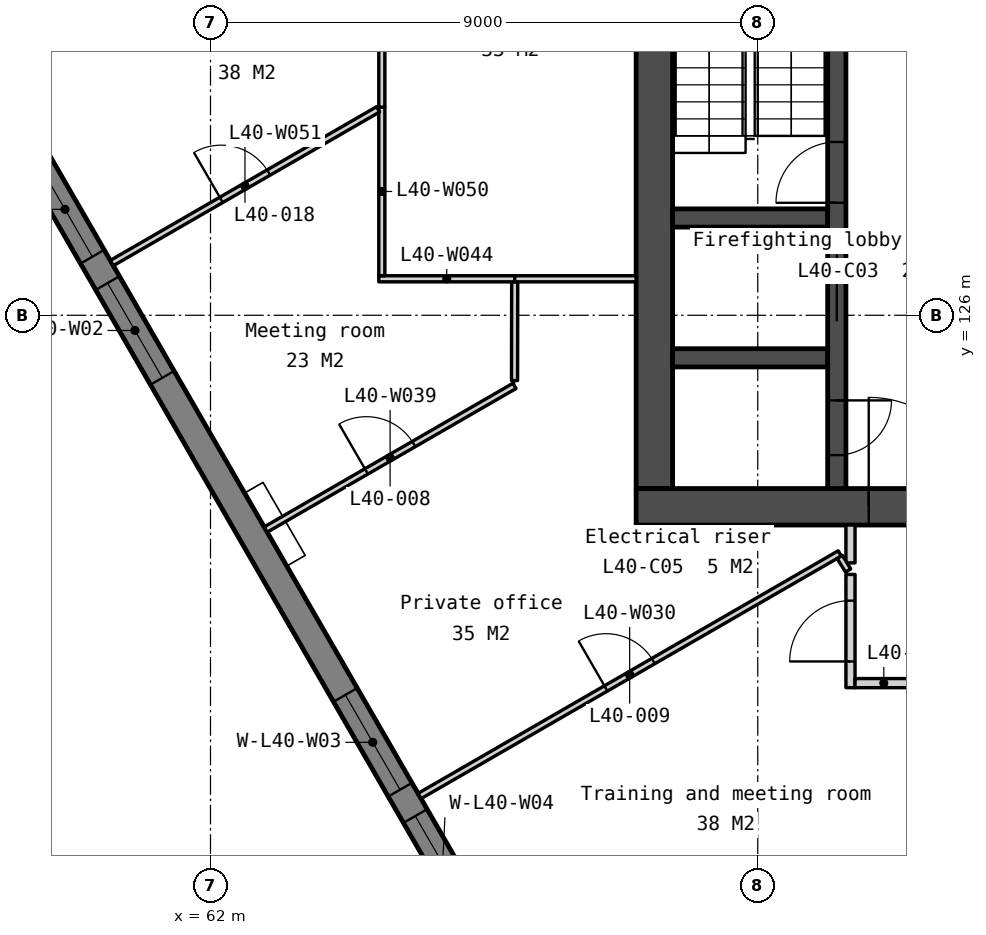
"""IFC4 building model, lengths in metres.
Left out: names, types, materials, properties, quantities, classifications, styles, units other than length and angle.
Written with IfcOpenShell. Run it as: python <this file> out.ifc"""

import sys

from ifc_helpers import new_model, si_unit, direction, frame, frame_2d, origin, place, context, subcontext, project, spatial, polyline, rectangle, outline, extrude, element, fill, save


model = new_model("IFC4")
c1 = context("Model", 3, precision=1e-05, world=origin(), true_north=direction((0.0, 1.0)))
c2 = subcontext(c1, "Body", "Model", "MODEL_VIEW")
j1 = project(units=[si_unit("LENGTHUNIT", "METRE"), si_unit("PLANEANGLEUNIT", "RADIAN")], contexts=[c1])
p1 = place(None, origin())
s1 = spatial("IfcSite", under=j1, at=p1, CompositionType="ELEMENT")
p2 = place(p1, origin())
s2 = spatial("IfcBuilding", under=s1, at=p2, CompositionType="ELEMENT")
p3 = place(p2, frame((0.0, 0.0, 159.8)))
s3 = spatial("IfcBuildingStorey", under=s2, at=p3, CompositionType="ELEMENT", Elevation=159.8)
p4 = place(p3, frame((69.3, 133.95, 0.0), z_axis=(0.0, 0.0, 1.0), x_axis=(0.0, -1.0, 0.0)))
e1 = element("IfcWall", 1, at=p4, inside=s3, PredefinedType="SOLIDWALL", context=c2, shape_type="SweptSolid", body=[
    extrude(rectangle(XDim=10.8, YDim=0.6, at=frame_2d((5.4, 0.0))), origin(), (0.0, 0.0, 1.0), 3.75),
])
p5 = place(p3, frame((69.0, 122.85, 0.0), z_axis=(0.0, 0.0, 1.0), x_axis=(1.0, 0.0, 0.0)))
e2 = element("IfcWall", 2, at=p5, inside=s3, PredefinedType="SOLIDWALL", context=c2, shape_type="SweptSolid", body=[
    extrude(rectangle(XDim=22.0, YDim=0.6, at=frame_2d((11.0, 0.0))), origin(), (0.0, 0.0, 1.0), 3.75),
])
p6 = place(p5, frame((16.375, 0.0, 0.0)))
e3 = element("IfcOpeningElement", 3, at=p6, cuts=e2, PredefinedType="OPENING", context=c2, shape_type="SweptSolid", body=[
    extrude(rectangle(XDim=1.8, YDim=2.1, at=frame_2d((0.9, 1.05))), frame((0.0, 0.31, 0.0), z_axis=(0.0, -1.0, 0.0), x_axis=(1.0, 0.0, 0.0)), (0.0, 0.0, 1.0), 0.62),
])
p7 = place(p5, frame((3.825, 0.0, 0.0)))
e4 = element("IfcOpeningElement", 4, at=p7, cuts=e2, PredefinedType="OPENING", context=c2, shape_type="SweptSolid", body=[
    extrude(rectangle(XDim=1.8, YDim=2.1, at=frame_2d((0.9, 1.05))), frame((0.0, 0.31, 0.0), z_axis=(0.0, -1.0, 0.0), x_axis=(1.0, 0.0, 0.0)), (0.0, 0.0, 1.0), 0.62),
])
p8 = place(p5, frame((12.85, 0.0, 0.0)))
e5 = element("IfcOpeningElement", 5, at=p8, cuts=e2, PredefinedType="OPENING", context=c2, shape_type="SweptSolid", body=[
    extrude(rectangle(XDim=1.5, YDim=2.1, at=frame_2d((0.75, 1.05))), frame((0.0, 0.31, 0.0), z_axis=(0.0, -1.0, 0.0), x_axis=(1.0, 0.0, 0.0)), (0.0, 0.0, 1.0), 0.62),
])
for number, where, z_axis, x_axis in (
    (6, (69.6, 127.6, 0.0), (0.0, 0.0, 1.0), (1.0, 0.0, 0.0)),
    (7, (69.6, 125.3, 0.0), (0.0, 0.0, 1.0), (1.0, 0.0, 0.0)),
):
    element("IfcWall", number, at=place(p3, frame(where, z_axis=z_axis, x_axis=x_axis)), inside=s3, PredefinedType="SOLIDWALL", context=c2, shape_type="SweptSolid", body=[
        extrude(rectangle(XDim=2.55, YDim=0.3, at=frame_2d((1.275, 0.0))), origin(), (0.0, 0.0, 1.0), 3.75),
    ])
p9 = place(p3, frame((72.3, 133.95, 0.0), z_axis=(0.0, 0.0, 1.0), x_axis=(0.0, -1.0, 0.0)))
e8 = element("IfcWall", 8, at=p9, inside=s3, PredefinedType="SOLIDWALL", context=c2, shape_type="SweptSolid", body=[
    extrude(rectangle(XDim=10.8, YDim=0.3, at=frame_2d((5.4, 0.0))), origin(), (0.0, 0.0, 1.0), 3.75),
])
p10 = place(p9, frame((6.95, 0.0, 0.0)))
e9 = element("IfcOpeningElement", 9, at=p10, cuts=e8, PredefinedType="OPENING", context=c2, shape_type="SweptSolid", body=[
    extrude(rectangle(XDim=1.1, YDim=2.1, at=frame_2d((0.55, 1.05))), frame((0.0, 0.16, 0.0), z_axis=(0.0, -1.0, 0.0), x_axis=(1.0, 0.0, 0.0)), (0.0, 0.0, 1.0), 0.32),
])
p11 = place(p9, frame((9.35, 0.0, 0.0)))
e10 = element("IfcOpeningElement", 10, at=p11, cuts=e8, PredefinedType="OPENING", context=c2, shape_type="SweptSolid", body=[
    extrude(rectangle(XDim=0.9, YDim=2.1, at=frame_2d((0.45, 1.05))), frame((0.0, 0.16, 0.0), z_axis=(0.0, -1.0, 0.0), x_axis=(1.0, 0.0, 0.0)), (0.0, 0.0, 1.0), 0.32),
])
p12 = place(p9, frame((5.1, 0.0, 0.0)))
e11 = element("IfcOpeningElement", 11, at=p12, cuts=e8, PredefinedType="OPENING", context=c2, shape_type="SweptSolid", body=[
    extrude(rectangle(XDim=1.0, YDim=2.1, at=frame_2d((0.5, 1.05))), frame((0.0, 0.16, 0.0), z_axis=(0.0, -1.0, 0.0), x_axis=(1.0, 0.0, 0.0)), (0.0, 0.0, 1.0), 0.32),
])
p13 = place(p3, frame((57.652, 131.129, -0.15), z_axis=(0.0, 0.0, 1.0), x_axis=(0.499997369791, -0.866026922331, 0.0)))
e12 = element("IfcWall", 12, at=p13, inside=s3, PredefinedType="SOLIDWALL", context=c2, shape_type="SweptSolid", body=[
    extrude(outline(polyline([(40.486, 0.0), (40.486, 3.9), (0.0, 3.9), (0.0, 0.0), (40.486, 0.0)])), frame((0.0, 0.225, 0.0), z_axis=(0.0, -1.0, 0.0), x_axis=(1.0, 0.0, 0.0)), (0.0, 0.0, 1.0), 0.45),
])
p14 = place(p13, frame((3.011, 0.0, 0.95)))
e13 = element("IfcOpeningElement", 13, at=p14, cuts=e12, PredefinedType="OPENING", context=c2, shape_type="SweptSolid", body=[
    extrude(rectangle(XDim=1.8, YDim=2.2, at=frame_2d((0.9, 1.1))), frame((0.0, 0.235, 0.0), z_axis=(0.0, -1.0, 0.0), x_axis=(1.0, 0.0, 0.0)), (0.0, 0.0, 1.0), 0.47),
])
p15 = place(p13, frame((5.311, 0.0, 0.95)))
e14 = element("IfcOpeningElement", 14, at=p15, cuts=e12, PredefinedType="OPENING", context=c2, shape_type="SweptSolid", body=[
    extrude(rectangle(XDim=1.8, YDim=2.2, at=frame_2d((0.9, 1.1))), frame((0.0, 0.235, 0.0), z_axis=(0.0, -1.0, 0.0), x_axis=(1.0, 0.0, 0.0)), (0.0, 0.0, 1.0), 0.47),
])
p16 = place(p13, frame((13.132, 0.0, 0.95)))
e15 = element("IfcOpeningElement", 15, at=p16, cuts=e12, PredefinedType="OPENING", context=c2, shape_type="SweptSolid", body=[
    extrude(rectangle(XDim=1.8, YDim=2.2, at=frame_2d((0.9, 1.1))), frame((0.0, 0.235, 0.0), z_axis=(0.0, -1.0, 0.0), x_axis=(1.0, 0.0, 0.0)), (0.0, 0.0, 1.0), 0.47),
])
p17 = place(p13, frame((15.432, 0.0, 0.95)))
e16 = element("IfcOpeningElement", 16, at=p17, cuts=e12, PredefinedType="OPENING", context=c2, shape_type="SweptSolid", body=[
    extrude(rectangle(XDim=1.8, YDim=2.2, at=frame_2d((0.9, 1.1))), frame((0.0, 0.235, 0.0), z_axis=(0.0, -1.0, 0.0), x_axis=(1.0, 0.0, 0.0)), (0.0, 0.0, 1.0), 0.47),
])
p18 = place(p13, frame((23.254, 0.0, 0.95)))
e17 = element("IfcOpeningElement", 17, at=p18, cuts=e12, PredefinedType="OPENING", context=c2, shape_type="SweptSolid", body=[
    extrude(rectangle(XDim=1.8, YDim=2.2, at=frame_2d((0.9, 1.1))), frame((0.0, 0.235, 0.0), z_axis=(0.0, -1.0, 0.0), x_axis=(1.0, 0.0, 0.0)), (0.0, 0.0, 1.0), 0.47),
])
p19 = place(p13, frame((25.554, 0.0, 0.95)))
e18 = element("IfcOpeningElement", 18, at=p19, cuts=e12, PredefinedType="OPENING", context=c2, shape_type="SweptSolid", body=[
    extrude(rectangle(XDim=1.8, YDim=2.2, at=frame_2d((0.9, 1.1))), frame((0.0, 0.235, 0.0), z_axis=(0.0, -1.0, 0.0), x_axis=(1.0, 0.0, 0.0)), (0.0, 0.0, 1.0), 0.47),
])
p20 = place(p13, frame((33.375, 0.0, 0.95)))
e19 = element("IfcOpeningElement", 19, at=p20, cuts=e12, PredefinedType="OPENING", context=c2, shape_type="SweptSolid", body=[
    extrude(rectangle(XDim=1.8, YDim=2.2, at=frame_2d((0.9, 1.1))), frame((0.0, 0.235, 0.0), z_axis=(0.0, -1.0, 0.0), x_axis=(1.0, 0.0, 0.0)), (0.0, 0.0, 1.0), 0.47),
])
p21 = place(p13, frame((35.675, 0.0, 0.95)))
e20 = element("IfcOpeningElement", 20, at=p21, cuts=e12, PredefinedType="OPENING", context=c2, shape_type="SweptSolid", body=[
    extrude(rectangle(XDim=1.8, YDim=2.2, at=frame_2d((0.9, 1.1))), frame((0.0, 0.235, 0.0), z_axis=(0.0, -1.0, 0.0), x_axis=(1.0, 0.0, 0.0)), (0.0, 0.0, 1.0), 0.47),
])
p22 = place(p3, frame((67.968, 113.71, 0.0), z_axis=(0.0, 0.0, 1.0), x_axis=(0.866013415921, 0.500020763015, 0.0)))
e21 = element("IfcWall", 21, at=p22, inside=s3, PredefinedType="PARTITIONING", context=c2, shape_type="SweptSolid", body=[
    extrude(rectangle(XDim=7.84, YDim=0.1, at=frame_2d((3.92, 0.0))), origin(), (0.0, 0.0, 1.0), 3.75),
])
p23 = place(p22, frame((3.47, 0.0, 0.0)))
e22 = element("IfcOpeningElement", 22, at=p23, cuts=e21, PredefinedType="OPENING", context=c2, shape_type="SweptSolid", body=[
    extrude(rectangle(XDim=0.9, YDim=2.1, at=frame_2d((0.45, 1.05))), frame((0.0, 0.06, 0.0), z_axis=(0.0, -1.0, 0.0), x_axis=(1.0, 0.0, 0.0)), (0.0, 0.0, 1.0), 0.12),
])
p24 = place(p3, frame((65.438, 118.093, 0.0), z_axis=(0.0, 0.0, 1.0), x_axis=(0.866026120082, 0.499998759335, 0.0)))
e23 = element("IfcWall", 23, at=p24, inside=s3, PredefinedType="PARTITIONING", context=c2, shape_type="SweptSolid", body=[
    extrude(rectangle(XDim=7.98, YDim=0.1, at=frame_2d((3.99, 0.0))), origin(), (0.0, 0.0, 1.0), 3.75),
])
p25 = place(p24, frame((3.54, 0.0, 0.0)))
e24 = element("IfcOpeningElement", 24, at=p25, cuts=e23, PredefinedType="OPENING", context=c2, shape_type="SweptSolid", body=[
    extrude(rectangle(XDim=0.9, YDim=2.1, at=frame_2d((0.45, 1.05))), frame((0.0, 0.06, 0.0), z_axis=(0.0, -1.0, 0.0), x_axis=(1.0, 0.0, 0.0)), (0.0, 0.0, 1.0), 0.12),
])
p26 = place(p3, frame((72.525, 119.875, 0.0), z_axis=(0.0, 0.0, 1.0), x_axis=(0.0, 1.0, 0.0)))
e25 = element("IfcWall", 25, at=p26, inside=s3, PredefinedType="PARTITIONING", context=c2, shape_type="SweptSolid", body=[
    extrude(rectangle(XDim=1.863, YDim=0.15, at=frame_2d((0.931, 0.0))), origin(), (0.0, 0.0, 1.0), 3.75),
])
p27 = place(p26, frame((0.431, 0.0, 0.0)))
e26 = element("IfcOpeningElement", 26, at=p27, cuts=e25, PredefinedType="OPENING", context=c2, shape_type="SweptSolid", body=[
    extrude(rectangle(XDim=1.0, YDim=2.1, at=frame_2d((0.5, 1.05))), frame((0.0, 0.085, 0.0), z_axis=(0.0, -1.0, 0.0), x_axis=(1.0, 0.0, 0.0)), (0.0, 0.0, 1.0), 0.17),
])
p28 = place(p3, frame((72.6, 119.95, 0.0), z_axis=(0.0, 0.0, 1.0), x_axis=(1.0, 0.0, 0.0)))
e27 = element("IfcWall", 27, at=p28, inside=s3, PredefinedType="PARTITIONING", context=c2, shape_type="SweptSolid", body=[
    extrude(rectangle(XDim=0.945, YDim=0.15, at=frame_2d((0.473, 0.0))), origin(), (0.0, 0.0, 1.0), 3.75),
])
p29 = place(p3, frame((72.525, 121.927, 0.0), z_axis=(0.0, 0.0, 1.0), x_axis=(0.0, 1.0, 0.0)))
e28 = element("IfcWall", 28, at=p29, inside=s3, PredefinedType="PARTITIONING", context=c2, shape_type="SweptSolid", body=[
    extrude(rectangle(XDim=0.623, YDim=0.15, at=frame_2d((0.311, 0.0))), origin(), (0.0, 0.0, 1.0), 3.75),
])
p30 = place(p3, frame((72.349, 122.025, 0.0), z_axis=(0.0, 0.0, 1.0), x_axis=(0.521863852021, -0.853028791984, 0.0)))
e29 = element("IfcWall", 29, at=p30, inside=s3, PredefinedType="PARTITIONING", context=c2, shape_type="SweptSolid", body=[
    extrude(rectangle(XDim=0.262, YDim=0.1, at=frame_2d((0.131, 0.0))), origin(), (0.0, 0.0, 1.0), 3.75),
])
p31 = place(p3, frame((62.907, 122.476, 0.0), z_axis=(0.0, 0.0, 1.0), x_axis=(0.866028145587, 0.499995251029, 0.0)))
e30 = element("IfcWall", 30, at=p31, inside=s3, PredefinedType="PARTITIONING", context=c2, shape_type="SweptSolid", body=[
    extrude(rectangle(XDim=4.726, YDim=0.1, at=frame_2d((2.363, 0.0))), origin(), (0.0, 0.0, 1.0), 3.75),
])
p32 = place(p31, frame((1.913, 0.0, 0.0)))
e31 = element("IfcOpeningElement", 31, at=p32, cuts=e30, PredefinedType="OPENING", context=c2, shape_type="SweptSolid", body=[
    extrude(rectangle(XDim=0.9, YDim=2.1, at=frame_2d((0.45, 1.05))), frame((0.0, 0.06, 0.0), z_axis=(0.0, -1.0, 0.0), x_axis=(1.0, 0.0, 0.0)), (0.0, 0.0, 1.0), 0.12),
])
p33 = place(p3, frame((67.0, 124.925, 0.0), z_axis=(0.0, 0.0, 1.0), x_axis=(0.001803152591, 0.999998374319, 0.0)))
e32 = element("IfcWall", 32, at=p33, inside=s3, PredefinedType="PARTITIONING", context=c2, shape_type="SweptSolid", body=[
    extrude(rectangle(XDim=1.625, YDim=0.1, at=frame_2d((0.812, 0.0))), origin(), (0.0, 0.0, 1.0), 3.75),
])
p34 = place(p3, frame((64.768, 126.6, 0.0), z_axis=(0.0, 0.0, 1.0), x_axis=(1.0, 0.0, 0.0)))
e33 = element("IfcWall", 33, at=p34, inside=s3, PredefinedType="PARTITIONING", context=c2, shape_type="SweptSolid", body=[
    extrude(rectangle(XDim=2.235, YDim=0.1, at=frame_2d((1.118, 0.0))), origin(), (0.0, 0.0, 1.0), 3.75),
])
p35 = place(p3, frame((67.003, 126.6, 0.0), z_axis=(0.0, 0.0, 1.0), x_axis=(1.0, 0.0, 0.0)))
e34 = element("IfcWall", 34, at=p35, inside=s3, PredefinedType="PARTITIONING", context=c2, shape_type="SweptSolid", body=[
    extrude(rectangle(XDim=1.997, YDim=0.1, at=frame_2d((0.999, 0.0))), origin(), (0.0, 0.0, 1.0), 3.75),
])
p36 = place(p3, frame((64.818, 126.65, 0.0), z_axis=(0.0, 0.0, 1.0), x_axis=(0.0, 1.0, 0.0)))
e35 = element("IfcWall", 35, at=p36, inside=s3, PredefinedType="PARTITIONING", context=c2, shape_type="SweptSolid", body=[
    extrude(rectangle(XDim=2.772, YDim=0.1, at=frame_2d((1.386, 0.0))), origin(), (0.0, 0.0, 1.0), 3.75),
])
p37 = place(p3, frame((60.377, 126.859, 0.0), z_axis=(0.0, 0.0, 1.0), x_axis=(0.866030444867, 0.499991268487, 0.0)))
e36 = element("IfcWall", 36, at=p37, inside=s3, PredefinedType="PARTITIONING", context=c2, shape_type="SweptSolid", body=[
    extrude(rectangle(XDim=5.058, YDim=0.1, at=frame_2d((2.529, 0.0))), origin(), (0.0, 0.0, 1.0), 3.75),
])
p38 = place(p37, frame((2.079, 0.0, 0.0)))
e37 = element("IfcOpeningElement", 37, at=p38, cuts=e36, PredefinedType="OPENING", context=c2, shape_type="SweptSolid", body=[
    extrude(rectangle(XDim=0.9, YDim=2.1, at=frame_2d((0.45, 1.05))), frame((0.0, 0.06, 0.0), z_axis=(0.0, -1.0, 0.0), x_axis=(1.0, 0.0, 0.0)), (0.0, 0.0, 1.0), 0.12),
])
p39 = place(p3, frame((64.818, 129.422, 0.0), z_axis=(0.0, 0.0, 1.0), x_axis=(0.0, 1.0, 0.0)))
e38 = element("IfcWall", 38, at=p39, inside=s3, PredefinedType="PARTITIONING", context=c2, shape_type="SweptSolid", body=[
    extrude(rectangle(XDim=5.128, YDim=0.1, at=frame_2d((2.564, 0.0))), origin(), (0.0, 0.0, 1.0), 3.75),
])
p40 = place(p39, frame((2.114, 0.0, 0.0)))
e39 = element("IfcOpeningElement", 39, at=p40, cuts=e38, PredefinedType="OPENING", context=c2, shape_type="SweptSolid", body=[
    extrude(rectangle(XDim=0.9, YDim=2.1, at=frame_2d((0.45, 1.05))), frame((0.0, 0.06, 0.0), z_axis=(0.0, -1.0, 0.0), x_axis=(1.0, 0.0, 0.0)), (0.0, 0.0, 1.0), 0.12),
])
p41 = place(p10, origin())
e40 = element("IfcDoor", 40, at=p41, inside=s3, OperationType="SLIDING_TO_LEFT", PredefinedType="DOOR", context=c2, shape_type="SweptSolid", body=[
    extrude(rectangle(XDim=1.1, YDim=2.1, at=frame_2d((0.55, 1.05))), frame((0.0, 0.025, 0.0), z_axis=(0.0, -1.0, 0.0), x_axis=(1.0, 0.0, 0.0)), (0.0, 0.0, 1.0), 0.05),
])
fill(e9, e40)
p42 = place(p7, origin())
e41 = element("IfcDoor", 41, at=p42, inside=s3, OperationType="DOUBLE_DOOR_DOUBLE_SWING", PredefinedType="DOOR", context=c2, shape_type="SweptSolid", body=[
    extrude(rectangle(XDim=1.8, YDim=2.1, at=frame_2d((0.9, 1.05))), frame((0.0, 0.025, 0.0), z_axis=(0.0, -1.0, 0.0), x_axis=(1.0, 0.0, 0.0)), (0.0, 0.0, 1.0), 0.05),
])
fill(e4, e41)
p43 = place(p11, origin())
e42 = element("IfcDoor", 42, at=p43, inside=s3, OperationType="SINGLE_SWING_LEFT", PredefinedType="DOOR", context=c2, shape_type="SweptSolid", body=[
    extrude(rectangle(XDim=0.9, YDim=2.1, at=frame_2d((0.45, 1.05))), frame((0.0, 0.025, 0.0), z_axis=(0.0, -1.0, 0.0), x_axis=(1.0, 0.0, 0.0)), (0.0, 0.0, 1.0), 0.05),
])
fill(e10, e42)
p44 = place(p12, origin())
e43 = element("IfcDoor", 43, at=p44, inside=s3, OperationType="SINGLE_SWING_RIGHT", PredefinedType="DOOR", context=c2, shape_type="SweptSolid", body=[
    extrude(rectangle(XDim=1.0, YDim=2.1, at=frame_2d((0.5, 1.05))), frame((0.0, 0.025, 0.0), z_axis=(0.0, -1.0, 0.0), x_axis=(1.0, 0.0, 0.0)), (0.0, 0.0, 1.0), 0.05),
])
fill(e11, e43)
p45 = place(p14, origin())
e44 = element("IfcWindow", 44, at=p45, inside=s3, PartitioningType="SINGLE_PANEL", PredefinedType="WINDOW", context=c2, shape_type="SweptSolid", body=[
    extrude(rectangle(XDim=1.8, YDim=2.2, at=frame_2d((0.9, 1.1))), frame((0.0, 0.03, 0.0), z_axis=(0.0, -1.0, 0.0), x_axis=(1.0, 0.0, 0.0)), (0.0, 0.0, 1.0), 0.06),
])
fill(e13, e44)
p46 = place(p15, origin())
e45 = element("IfcWindow", 45, at=p46, inside=s3, PartitioningType="SINGLE_PANEL", PredefinedType="WINDOW", context=c2, shape_type="SweptSolid", body=[
    extrude(rectangle(XDim=1.8, YDim=2.2, at=frame_2d((0.9, 1.1))), frame((0.0, 0.03, 0.0), z_axis=(0.0, -1.0, 0.0), x_axis=(1.0, 0.0, 0.0)), (0.0, 0.0, 1.0), 0.06),
])
fill(e14, e45)
p47 = place(p16, origin())
e46 = element("IfcWindow", 46, at=p47, inside=s3, PartitioningType="SINGLE_PANEL", PredefinedType="WINDOW", context=c2, shape_type="SweptSolid", body=[
    extrude(rectangle(XDim=1.8, YDim=2.2, at=frame_2d((0.9, 1.1))), frame((0.0, 0.03, 0.0), z_axis=(0.0, -1.0, 0.0), x_axis=(1.0, 0.0, 0.0)), (0.0, 0.0, 1.0), 0.06),
])
fill(e15, e46)
p48 = place(p17, origin())
e47 = element("IfcWindow", 47, at=p48, inside=s3, PartitioningType="SINGLE_PANEL", PredefinedType="WINDOW", context=c2, shape_type="SweptSolid", body=[
    extrude(rectangle(XDim=1.8, YDim=2.2, at=frame_2d((0.9, 1.1))), frame((0.0, 0.03, 0.0), z_axis=(0.0, -1.0, 0.0), x_axis=(1.0, 0.0, 0.0)), (0.0, 0.0, 1.0), 0.06),
])
fill(e16, e47)
p49 = place(p32, origin())
e48 = element("IfcDoor", 48, at=p49, inside=s3, OperationType="SINGLE_SWING_LEFT", PredefinedType="DOOR", context=c2, shape_type="SweptSolid", body=[
    extrude(rectangle(XDim=0.9, YDim=2.1, at=frame_2d((0.45, 1.05))), frame((0.0, 0.025, 0.0), z_axis=(0.0, -1.0, 0.0), x_axis=(1.0, 0.0, 0.0)), (0.0, 0.0, 1.0), 0.05),
])
fill(e31, e48)
p50 = place(p25, origin())
e49 = element("IfcDoor", 49, at=p50, inside=s3, OperationType="SINGLE_SWING_LEFT", PredefinedType="DOOR", context=c2, shape_type="SweptSolid", body=[
    extrude(rectangle(XDim=0.9, YDim=2.1, at=frame_2d((0.45, 1.05))), frame((0.0, 0.025, 0.0), z_axis=(0.0, -1.0, 0.0), x_axis=(1.0, 0.0, 0.0)), (0.0, 0.0, 1.0), 0.05),
])
fill(e24, e49)
p51 = place(p27, origin())
e50 = element("IfcDoor", 50, at=p51, inside=s3, OperationType="SINGLE_SWING_LEFT", PredefinedType="DOOR", context=c2, shape_type="SweptSolid", body=[
    extrude(rectangle(XDim=1.0, YDim=2.1, at=frame_2d((0.5, 1.05))), frame((0.0, 0.025, 0.0), z_axis=(0.0, -1.0, 0.0), x_axis=(1.0, 0.0, 0.0)), (0.0, 0.0, 1.0), 0.05),
])
fill(e26, e50)
p52 = place(p38, origin())
e51 = element("IfcDoor", 51, at=p52, inside=s3, OperationType="SINGLE_SWING_LEFT", PredefinedType="DOOR", context=c2, shape_type="SweptSolid", body=[
    extrude(rectangle(XDim=0.9, YDim=2.1, at=frame_2d((0.45, 1.05))), frame((0.0, 0.025, 0.0), z_axis=(0.0, -1.0, 0.0), x_axis=(1.0, 0.0, 0.0)), (0.0, 0.0, 1.0), 0.05),
])
fill(e37, e51)
save(model, sys.argv[1])
